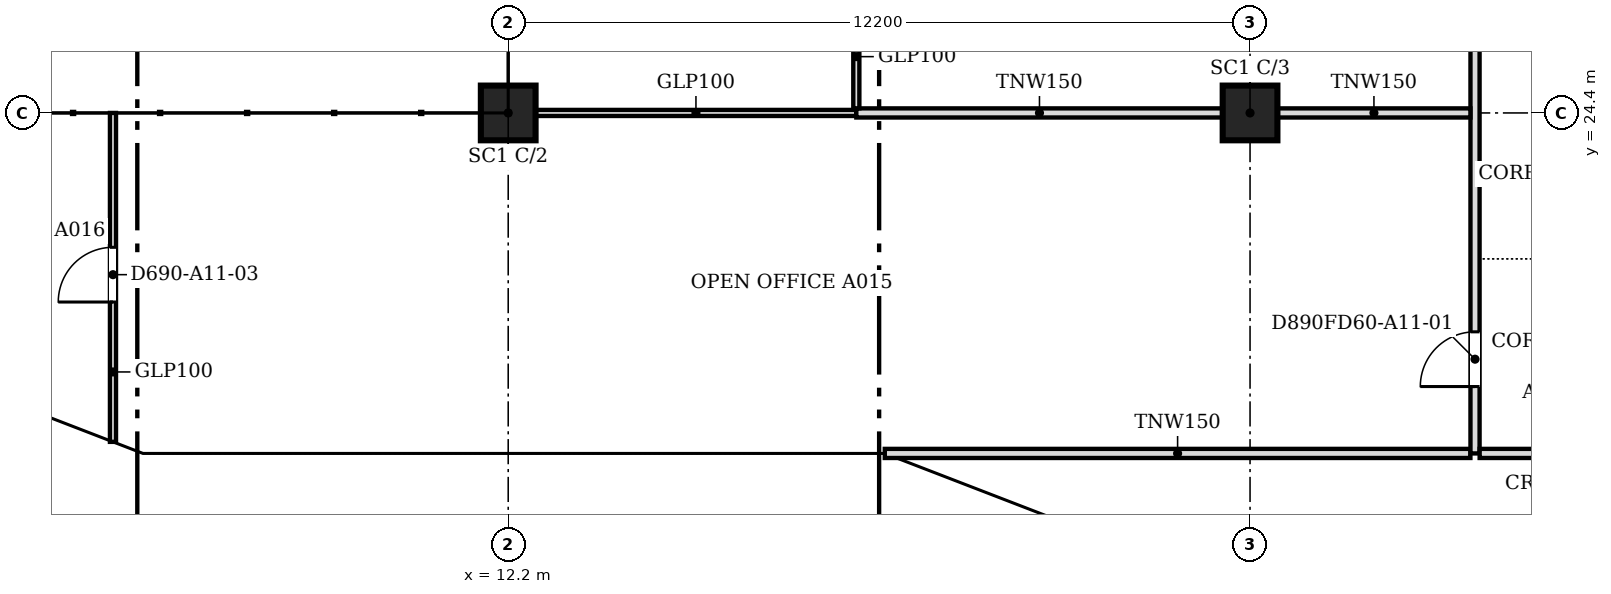
"""IFC4 building model, lengths in metres.
Left out: names, types, materials, properties, quantities, classifications, styles, units other than length and angle.
Written with IfcOpenShell. Run it as: python <this file> out.ifc"""

import sys

from ifc_helpers import new_model, si_unit, direction, frame, frame_2d, origin, origin_2d, place, context, subcontext, project, spatial, polyline, rectangle, outline, extrude, faceted_brep, source, transform, mapped, element, fill, save


model = new_model("IFC4")
c1 = context("Model", 3, precision=1e-05, world=origin(), true_north=direction((0.0, 1.0)))
c2 = subcontext(c1, "Body", "Model", "MODEL_VIEW")
j1 = project(units=[si_unit("LENGTHUNIT", "METRE"), si_unit("PLANEANGLEUNIT", "RADIAN")], contexts=[c1])
p1 = place(None, origin())
s1 = spatial("IfcSite", under=j1, at=p1, CompositionType="ELEMENT")
p2 = place(p1, origin())
s2 = spatial("IfcBuilding", under=s1, at=p2, CompositionType="ELEMENT")
p3 = place(p2, frame((0.0, 0.0, 131.6)))
s3 = spatial("IfcBuildingStorey", under=s2, at=p3, CompositionType="ELEMENT", Elevation=131.6)
for number, where, z_axis, x_axis in (
    (1, (12.2, 24.4, 0.0), (0.0, 0.0, 1.0), (1.0, 0.0, 0.0)),
    (2, (24.4, 24.4, 0.0), (0.0, 0.0, 1.0), (1.0, 0.0, 0.0)),
):
    element("IfcColumn", number, at=place(p3, frame(where, z_axis=z_axis, x_axis=x_axis)), inside=s3, PredefinedType="COLUMN", context=c2, shape_type="SweptSolid", body=[
        extrude(rectangle(XDim=0.9, YDim=0.9, at=origin_2d()), origin(), (0.0, 0.0, 1.0), 3.6),
    ])
m1 = source(origin(), c2, "Body", "Brep", [
    faceted_brep([(0.053, -0.25, 0.0), (3.003, -0.25, 3.8), (0.053, -0.25, 7.6), (0.0, -0.25, 7.531), (0.0, -0.25, 0.068), (0.106, 0.25, 7.532), (2.957, 0.25, 3.86), (2.957, 0.25, 3.74), (0.106, 0.25, 0.068), (3.003, 0.0, 3.8), (0.053, 0.0, 0.0), (0.053, 0.0, 7.6)], [[[0, 1, 2, 3, 4]], [[5, 6, 7, 8]], [[8, 7, 9, 1, 0, 10]], [[6, 5, 11, 2, 1, 9]], [[3, 2, 11]], [[10, 0, 4]], [[8, 10, 4, 3, 11, 5]], [[7, 6, 9]]]),
])
p4 = place(p3, frame((3.344, 19.631, -3.8), z_axis=(0.0, 0.0, 1.0), x_axis=(0.933007896601, -0.359855894603, 0.0)))
e3 = element("IfcWall", 3, at=p4, inside=s3, PredefinedType="SOLIDWALL", context=c2, shape_type="MappedRepresentation", body=[
    mapped(m1, transform((0.0, 0.0, 0.0), scale=1.0)),
])
m2 = source(origin(), c2, "Body", "SweptSolid", [
    extrude(outline(polyline([(0.253, 0.665), (2.687, 3.8), (0.253, 6.935), (0.253, 0.665)])), frame((0.0, 0.26, 0.0), z_axis=(0.0, -1.0, 0.0), x_axis=(1.0, 0.0, 0.0)), (0.0, 0.0, 1.0), 0.52),
])
p5 = place(p4, origin())
e4 = element("IfcOpeningElement", 4, at=p5, cuts=e3, PredefinedType="OPENING", context=c2, shape_type="MappedRepresentation", body=[
    mapped(m2, transform((0.0, 0.0, 0.0), scale=1.0)),
])
m3 = source(origin(), c2, "Body", "Brep", [
    faceted_brep([(3.003, -0.25, 0.0), (6.053, -0.25, 3.8), (3.003, -0.25, 7.6), (0.0, -0.25, 3.8), (0.047, 0.25, 3.859), (3.003, 0.25, 7.6), (6.053, 0.25, 3.8), (3.003, 0.25, 0.0), (0.047, 0.25, 3.741), (0.0, 0.0, 3.8)], [[[0, 1, 2, 3]], [[4, 5, 6, 7, 8]], [[7, 6, 1, 0]], [[6, 5, 2, 1]], [[5, 4, 9, 3, 2]], [[8, 7, 0, 3, 9]], [[8, 9, 4]]]),
])
p6 = place(p3, frame((6.146, 18.55, -3.8), z_axis=(0.0, 0.0, 1.0), x_axis=(1.0, 0.0, 0.0)))
e5 = element("IfcWall", 5, at=p6, inside=s3, PredefinedType="SOLIDWALL", context=c2, shape_type="MappedRepresentation", body=[
    mapped(m3, transform((0.0, 0.0, 0.0), scale=1.0)),
])
m4 = source(origin(), c2, "Body", "SweptSolid", [
    extrude(outline(polyline([(3.005, 0.401), (5.733, 3.8), (3.005, 7.199), (0.319, 3.8), (3.005, 0.401)])), frame((0.0, 0.26, 0.0), z_axis=(0.0, -1.0, 0.0), x_axis=(1.0, 0.0, 0.0)), (0.0, 0.0, 1.0), 0.52),
])
p7 = place(p6, origin())
e6 = element("IfcOpeningElement", 6, at=p7, cuts=e5, PredefinedType="OPENING", context=c2, shape_type="MappedRepresentation", body=[
    mapped(m4, transform((0.0, 0.0, 0.0), scale=1.0)),
])
m5 = source(origin(), c2, "Body", "Brep", [
    faceted_brep([(3.05, -0.25, 0.0), (6.1, -0.25, 3.743), (6.1, -0.25, 3.857), (3.05, -0.25, 7.6), (0.0, -0.25, 3.8), (0.0, 0.25, 3.8), (3.05, 0.25, 7.6), (6.146, 0.25, 3.8), (3.05, 0.25, 0.0), (6.146, -0.0, 3.8)], [[[0, 1, 2, 3, 4]], [[5, 6, 7, 8]], [[8, 7, 9, 1, 0]], [[7, 6, 3, 2, 9]], [[6, 5, 4, 3]], [[5, 8, 0, 4]], [[1, 9, 2]]]),
])
p8 = place(p3, frame((12.2, 18.55, -3.8), z_axis=(0.0, 0.0, 1.0), x_axis=(1.0, 0.0, 0.0)))
e7 = element("IfcWall", 7, at=p8, inside=s3, PredefinedType="SOLIDWALL", context=c2, shape_type="MappedRepresentation", body=[
    mapped(m5, transform((0.0, 0.0, 0.0), scale=1.0)),
])
m6 = source(origin(), c2, "Body", "SweptSolid", [
    extrude(outline(polyline([(3.052, 0.397), (5.824, 3.8), (3.052, 7.202), (0.321, 3.8), (3.052, 0.397)])), frame((0.0, 0.26, 0.0), z_axis=(0.0, -1.0, 0.0), x_axis=(1.0, 0.0, 0.0)), (0.0, 0.0, 1.0), 0.52),
])
p9 = place(p8, origin())
e8 = element("IfcOpeningElement", 8, at=p9, cuts=e7, PredefinedType="OPENING", context=c2, shape_type="MappedRepresentation", body=[
    mapped(m6, transform((0.0, 0.0, 0.0), scale=1.0)),
])
m7 = source(origin(), c2, "Body", "Brep", [
    faceted_brep([(3.096, -0.25, 7.536), (0.047, -0.25, 3.856), (0.047, -0.25, 3.744), (3.096, -0.25, 0.064), (0.0, 0.25, 3.8), (3.149, 0.25, 7.6), (3.202, 0.25, 7.536), (3.202, 0.25, 0.064), (3.149, 0.25, 0.0), (3.149, -0.0, 0.0), (3.149, -0.0, 7.6), (0.0, 0.0, 3.8)], [[[0, 1, 2, 3]], [[4, 5, 6, 7, 8]], [[8, 7, 9]], [[6, 5, 10]], [[5, 4, 11, 1, 0, 10]], [[4, 8, 9, 3, 2, 11]], [[2, 1, 11]], [[3, 9, 7, 6, 10, 0]]]),
])
p10 = place(p3, frame((18.346, 18.55, -3.8), z_axis=(0.0, 0.0, 1.0), x_axis=(0.932985567668, -0.359913782069, 0.0)))
e9 = element("IfcWall", 9, at=p10, inside=s3, PredefinedType="SOLIDWALL", context=c2, shape_type="MappedRepresentation", body=[
    mapped(m7, transform((0.0, 0.0, 0.0), scale=1.0)),
])
m8 = source(origin(), c2, "Body", "SweptSolid", [
    extrude(outline(polyline([(2.949, 6.967), (0.325, 3.8), (2.949, 0.633), (2.949, 6.967)])), frame((0.0, 0.26, 0.0), z_axis=(0.0, -1.0, 0.0), x_axis=(1.0, 0.0, 0.0)), (0.0, 0.0, 1.0), 0.52),
])
p11 = place(p10, origin())
e10 = element("IfcOpeningElement", 10, at=p11, cuts=e9, PredefinedType="OPENING", context=c2, shape_type="MappedRepresentation", body=[
    mapped(m8, transform((0.0, 0.0, 0.0), scale=1.0)),
])
p12 = place(p2, frame((0.0, 0.0, 135.4)))
s4 = spatial("IfcBuildingStorey", under=s2, at=p12, CompositionType="ELEMENT", Elevation=135.4)
m9 = source(origin(), c2, "Body", "Brep", [
    faceted_brep([(2.95, -0.25, 0.0), (2.997, -0.25, 0.059), (2.997, -0.25, 7.541), (2.95, -0.25, 7.6), (0.0, -0.25, 3.8), (0.053, 0.25, 3.868), (2.904, 0.25, 7.54), (2.904, 0.25, 0.06), (0.053, 0.25, 3.732), (2.95, 0.0, 0.0), (2.95, 0.0, 7.6), (0.0, 0.0, 3.8)], [[[0, 1, 2, 3, 4]], [[5, 6, 7, 8]], [[1, 0, 9]], [[10, 3, 2]], [[6, 5, 11, 4, 3, 10]], [[8, 7, 9, 0, 4, 11]], [[8, 11, 5]], [[1, 9, 7, 6, 10, 2]]]),
])
p13 = place(p12, frame((3.394, 19.612, -3.8), z_axis=(0.0, 0.0, 1.0), x_axis=(0.932990326376, -0.359901446078, 0.0)))
e11 = element("IfcWall", 11, at=p13, inside=s4, PredefinedType="SOLIDWALL", context=c2, shape_type="MappedRepresentation", body=[
    mapped(m9, transform((0.0, 0.0, 0.0), scale=1.0)),
])
m10 = source(origin(), c2, "Body", "SweptSolid", [
    extrude(outline(polyline([(2.75, 6.935), (0.316, 3.8), (2.75, 0.665), (2.75, 6.935)])), frame((0.0, 0.26, 0.0), z_axis=(0.0, -1.0, 0.0), x_axis=(1.0, 0.0, 0.0)), (0.0, 0.0, 1.0), 0.52),
])
p14 = place(p13, origin())
e12 = element("IfcOpeningElement", 12, at=p14, cuts=e11, PredefinedType="OPENING", context=c2, shape_type="MappedRepresentation", body=[
    mapped(m10, transform((0.0, 0.0, 0.0), scale=1.0)),
])
m11 = source(origin(), c2, "Body", "Brep", [
    faceted_brep([(0.047, -0.25, 0.0), (3.05, -0.25, 3.8), (0.047, -0.25, 7.6), (0.0, -0.25, 7.54), (0.0, -0.25, 0.06), (0.093, 0.25, 7.541), (3.05, 0.25, 3.8), (0.093, 0.25, 0.059), (0.047, 0.0, 0.0), (0.047, 0.0, 7.6)], [[[0, 1, 2, 3, 4]], [[5, 6, 7]], [[7, 6, 1, 0, 8]], [[6, 5, 9, 2, 1]], [[3, 2, 9]], [[8, 0, 4]], [[7, 8, 4, 3, 9, 5]]]),
])
p15 = place(p12, frame((6.1, 18.55, -3.8), z_axis=(0.0, 0.0, 1.0), x_axis=(1.0, 0.0, 0.0)))
e13 = element("IfcWall", 13, at=p15, inside=s4, PredefinedType="SOLIDWALL", context=c2, shape_type="MappedRepresentation", body=[
    mapped(m11, transform((0.0, 0.0, 0.0), scale=1.0)),
])
m12 = source(origin(), c2, "Body", "SweptSolid", [
    extrude(outline(polyline([(0.247, 0.656), (2.731, 3.8), (0.247, 6.944), (0.247, 0.656)])), frame((0.0, 0.26, 0.0), z_axis=(0.0, -1.0, 0.0), x_axis=(1.0, 0.0, 0.0)), (0.0, 0.0, 1.0), 0.52),
])
p16 = place(p15, origin())
e14 = element("IfcOpeningElement", 14, at=p16, cuts=e13, PredefinedType="OPENING", context=c2, shape_type="MappedRepresentation", body=[
    mapped(m12, transform((0.0, 0.0, 0.0), scale=1.0)),
])
m13 = source(origin(), c2, "Body", "SweptSolid", [
    extrude(outline(polyline([(3.05, 0.0), (6.1, 3.8), (3.05, 7.6), (0.0, 3.8), (3.05, 0.0)])), frame((0.0, 0.25, 0.0), z_axis=(0.0, -1.0, 0.0), x_axis=(1.0, 0.0, 0.0)), (0.0, 0.0, 1.0), 0.5),
])
p17 = place(p12, frame((9.15, 18.55, -3.8), z_axis=(0.0, 0.0, 1.0), x_axis=(1.0, 0.0, 0.0)))
e15 = element("IfcWall", 15, at=p17, inside=s4, PredefinedType="SOLIDWALL", context=c2, shape_type="MappedRepresentation", body=[
    mapped(m13, transform((0.0, 0.0, 0.0), scale=1.0)),
])
m14 = source(origin(), c2, "Body", "SweptSolid", [
    extrude(outline(polyline([(3.05, 0.399), (5.78, 3.8), (3.05, 7.2), (0.321, 3.8), (3.05, 0.399)])), frame((0.0, 0.26, 0.0), z_axis=(0.0, -1.0, 0.0), x_axis=(1.0, 0.0, 0.0)), (0.0, 0.0, 1.0), 0.52),
])
p18 = place(p17, origin())
e16 = element("IfcOpeningElement", 16, at=p18, cuts=e15, PredefinedType="OPENING", context=c2, shape_type="MappedRepresentation", body=[
    mapped(m14, transform((0.0, 0.0, 0.0), scale=1.0)),
])
m15 = source(origin(), c2, "Body", "Brep", [
    faceted_brep([(3.05, -0.25, 7.543), (0.0, -0.25, 3.8), (3.05, -0.25, 0.057), (0.0, 0.25, 3.8), (3.096, 0.25, 7.6), (3.143, 0.25, 7.543), (3.143, 0.25, 0.056), (3.096, 0.25, 0.0), (3.096, -0.0, 0.0), (3.096, -0.0, 7.6)], [[[0, 1, 2]], [[3, 4, 5, 6, 7]], [[7, 6, 8]], [[5, 4, 9]], [[4, 3, 1, 0, 9]], [[3, 7, 8, 2, 1]], [[2, 8, 6, 5, 9, 0]]]),
])
p19 = place(p12, frame((15.25, 18.55, -3.8), z_axis=(0.0, 0.0, 1.0), x_axis=(1.0, 0.0, 0.0)))
e17 = element("IfcWall", 17, at=p19, inside=s4, PredefinedType="SOLIDWALL", context=c2, shape_type="MappedRepresentation", body=[
    mapped(m15, transform((0.0, 0.0, 0.0), scale=1.0)),
])
m16 = source(origin(), c2, "Body", "SweptSolid", [
    extrude(outline(polyline([(2.896, 6.959), (0.323, 3.8), (2.896, 0.641), (2.896, 6.959)])), frame((0.0, 0.26, 0.0), z_axis=(0.0, -1.0, 0.0), x_axis=(1.0, 0.0, 0.0)), (0.0, 0.0, 1.0), 0.52),
])
p20 = place(p19, origin())
e18 = element("IfcOpeningElement", 18, at=p20, cuts=e17, PredefinedType="OPENING", context=c2, shape_type="MappedRepresentation", body=[
    mapped(m16, transform((0.0, 0.0, 0.0), scale=1.0)),
])
m17 = source(origin(), c2, "Body", "Brep", [
    faceted_brep([(0.093, -0.25, 0.056), (3.143, -0.25, 3.736), (3.143, -0.25, 3.864), (0.093, -0.25, 7.544), (0.0, 0.25, 7.543), (0.047, 0.25, 7.6), (3.196, 0.25, 3.8), (0.047, 0.25, 0.0), (0.0, 0.25, 0.057), (3.196, -0.0, 3.8), (0.047, 0.0, 0.0), (0.047, 0.0, 7.6)], [[[0, 1, 2, 3]], [[4, 5, 6, 7, 8]], [[7, 6, 9, 1, 0, 10]], [[6, 5, 11, 3, 2, 9]], [[5, 4, 11]], [[8, 7, 10]], [[8, 10, 0, 3, 11, 4]], [[1, 9, 2]]]),
])
p21 = place(p12, frame((18.303, 18.567, -3.8), z_axis=(0.0, 0.0, 1.0), x_axis=(0.932978940178, -0.359930961693, 0.0)))
e19 = element("IfcWall", 19, at=p21, inside=s4, PredefinedType="SOLIDWALL", context=c2, shape_type="MappedRepresentation", body=[
    mapped(m17, transform((0.0, 0.0, 0.0), scale=1.0)),
])
m18 = source(origin(), c2, "Body", "SweptSolid", [
    extrude(outline(polyline([(0.247, 0.633), (2.871, 3.8), (0.247, 6.967), (0.247, 0.633)])), frame((0.0, 0.26, 0.0), z_axis=(0.0, -1.0, 0.0), x_axis=(1.0, 0.0, 0.0)), (0.0, 0.0, 1.0), 0.52),
])
p22 = place(p21, origin())
e20 = element("IfcOpeningElement", 20, at=p22, cuts=e19, PredefinedType="OPENING", context=c2, shape_type="MappedRepresentation", body=[
    mapped(m18, transform((0.0, 0.0, 0.0), scale=1.0)),
])
p23 = place(p3, frame((18.393, 18.8, 0.0), z_axis=(0.0, 0.0, 1.0), x_axis=(1.0, 0.0, 0.0)))
e21 = element("IfcWall", 21, at=p23, inside=s3, PredefinedType="PARTITIONING", context=c2, shape_type="SweptSolid", body=[
    extrude(rectangle(XDim=9.631, YDim=0.15, at=frame_2d((4.815, 0.0))), origin(), (0.0, 0.0, 1.0), 3.067),
])
p24 = place(p3, frame((28.1, 18.8, 0.0), z_axis=(0.0, 0.0, 1.0), x_axis=(0.0, 1.0, 0.0)))
e22 = element("IfcWall", 22, at=p24, inside=s3, PredefinedType="PARTITIONING", context=c2, shape_type="SweptSolid", body=[
    extrude(rectangle(XDim=26.5, YDim=0.15, at=frame_2d((13.25, 0.0))), origin(), (0.0, 0.0, 1.0), 3.067),
])
m19 = source(origin(), c2, "Body", "SweptSolid", [
    extrude(rectangle(XDim=0.9, YDim=2.1, at=frame_2d((0.45, 1.05))), frame((0.0, 0.085, 0.0), z_axis=(0.0, -1.0, 0.0), x_axis=(1.0, 0.0, 0.0)), (0.0, 0.0, 1.0), 0.17),
])
p25 = place(p24, frame((1.1, 0.0, 0.0)))
e23 = element("IfcOpeningElement", 23, at=p25, cuts=e22, PredefinedType="OPENING", context=c2, shape_type="MappedRepresentation", body=[
    mapped(m19, transform((0.0, 0.0, 0.0), scale=1.0)),
])
p26 = place(p24, frame((9.7, 0.0, 0.0)))
e24 = element("IfcOpeningElement", 24, at=p26, cuts=e22, PredefinedType="OPENING", context=c2, shape_type="MappedRepresentation", body=[
    mapped(m19, transform((0.0, 0.0, 0.0), scale=1.0)),
])
p27 = place(p24, frame((20.15, 0.0, 0.0)))
e25 = element("IfcOpeningElement", 25, at=p27, cuts=e22, PredefinedType="OPENING", context=c2, shape_type="MappedRepresentation", body=[
    mapped(m19, transform((0.0, 0.0, 0.0), scale=1.0)),
])
p28 = place(p3, frame((28.176, 18.8, 0.0), z_axis=(0.0, 0.0, 1.0), x_axis=(1.0, 0.0, 0.0)))
e26 = element("IfcWall", 26, at=p28, inside=s3, PredefinedType="PARTITIONING", context=c2, shape_type="SweptSolid", body=[
    extrude(rectangle(XDim=2.248, YDim=0.15, at=frame_2d((1.124, 0.0))), origin(), (0.0, 0.0, 1.0), 3.067),
])
p29 = place(p3, frame((5.7, 18.99, 0.0), z_axis=(0.0, 0.0, 1.0), x_axis=(0.0, 1.0, 0.0)))
e27 = element("IfcWall", 27, at=p29, inside=s3, PredefinedType="PARTITIONING", context=c2, shape_type="SweptSolid", body=[
    extrude(rectangle(XDim=5.41, YDim=0.1, at=frame_2d((2.705, 0.0))), origin(), (0.0, 0.0, 1.0), 3.067),
])
m20 = source(origin(), c2, "Body", "SweptSolid", [
    extrude(rectangle(XDim=0.9, YDim=2.1, at=frame_2d((0.45, 1.05))), frame((0.0, 0.06, 0.0), z_axis=(0.0, -1.0, 0.0), x_axis=(1.0, 0.0, 0.0)), (0.0, 0.0, 1.0), 0.12),
])
p30 = place(p29, frame((2.3, 0.0, 0.0)))
e28 = element("IfcOpeningElement", 28, at=p30, cuts=e27, PredefinedType="OPENING", context=c2, shape_type="MappedRepresentation", body=[
    mapped(m20, transform((0.0, 0.0, 0.0), scale=1.0)),
])
p31 = place(p3, frame((12.651, 24.4, 0.0), z_axis=(0.0, 0.0, 1.0), x_axis=(1.0, 0.0, 0.0)))
e29 = element("IfcWall", 29, at=p31, inside=s3, PredefinedType="PARTITIONING", context=c2, shape_type="SweptSolid", body=[
    extrude(rectangle(XDim=5.273, YDim=0.1, at=frame_2d((2.637, 0.0))), origin(), (0.0, 0.0, 1.0), 3.067),
])
p32 = place(p3, frame((17.925, 24.4, 0.0), z_axis=(0.0, 0.0, 1.0), x_axis=(1.0, 0.0, 0.0)))
e30 = element("IfcWall", 30, at=p32, inside=s3, PredefinedType="PARTITIONING", context=c2, shape_type="SweptSolid", body=[
    extrude(rectangle(XDim=6.024, YDim=0.15, at=frame_2d((3.012, 0.0))), origin(), (0.0, 0.0, 1.0), 3.067),
])
p33 = place(p3, frame((24.851, 24.4, 0.0), z_axis=(0.0, 0.0, 1.0), x_axis=(1.0, 0.0, 0.0)))
e31 = element("IfcWall", 31, at=p33, inside=s3, PredefinedType="PARTITIONING", context=c2, shape_type="SweptSolid", body=[
    extrude(rectangle(XDim=3.173, YDim=0.15, at=frame_2d((1.586, 0.0))), origin(), (0.0, 0.0, 1.0), 3.067),
])
p34 = place(p3, frame((17.925, 24.476, 0.0), z_axis=(0.0, 0.0, 1.0), x_axis=(0.0, 1.0, 0.0)))
e32 = element("IfcWall", 32, at=p34, inside=s3, PredefinedType="PARTITIONING", context=c2, shape_type="SweptSolid", body=[
    extrude(rectangle(XDim=4.293, YDim=0.1, at=frame_2d((2.146, 0.0))), origin(), (0.0, 0.0, 1.0), 3.067),
])
p35 = place(p34, frame((1.7, 0.0, 0.0)))
e33 = element("IfcOpeningElement", 33, at=p35, cuts=e32, PredefinedType="OPENING", context=c2, shape_type="MappedRepresentation", body=[
    mapped(m20, transform((0.0, 0.0, 0.0), scale=1.0)),
])
m21 = source(origin(), c2, "Body", "SweptSolid", [
    extrude(rectangle(XDim=0.9, YDim=2.1, at=frame_2d((0.45, 1.05))), frame((0.0, 0.025, 0.0), z_axis=(0.0, -1.0, 0.0), x_axis=(1.0, 0.0, 0.0)), (0.0, 0.0, 1.0), 0.05),
])
p36 = place(p25, origin())
e34 = element("IfcDoor", 34, at=p36, inside=s3, OperationType="SINGLE_SWING_LEFT", PredefinedType="DOOR", context=c2, shape_type="MappedRepresentation", body=[
    mapped(m21, transform((0.0, 0.0, 0.0), scale=1.0)),
])
fill(e23, e34)
p37 = place(p30, origin())
e35 = element("IfcDoor", 35, at=p37, inside=s3, OperationType="SINGLE_SWING_LEFT", PredefinedType="DOOR", context=c2, shape_type="MappedRepresentation", body=[
    mapped(m21, transform((0.0, 0.0, 0.0), scale=1.0)),
])
fill(e28, e35)
save(model, sys.argv[1])
